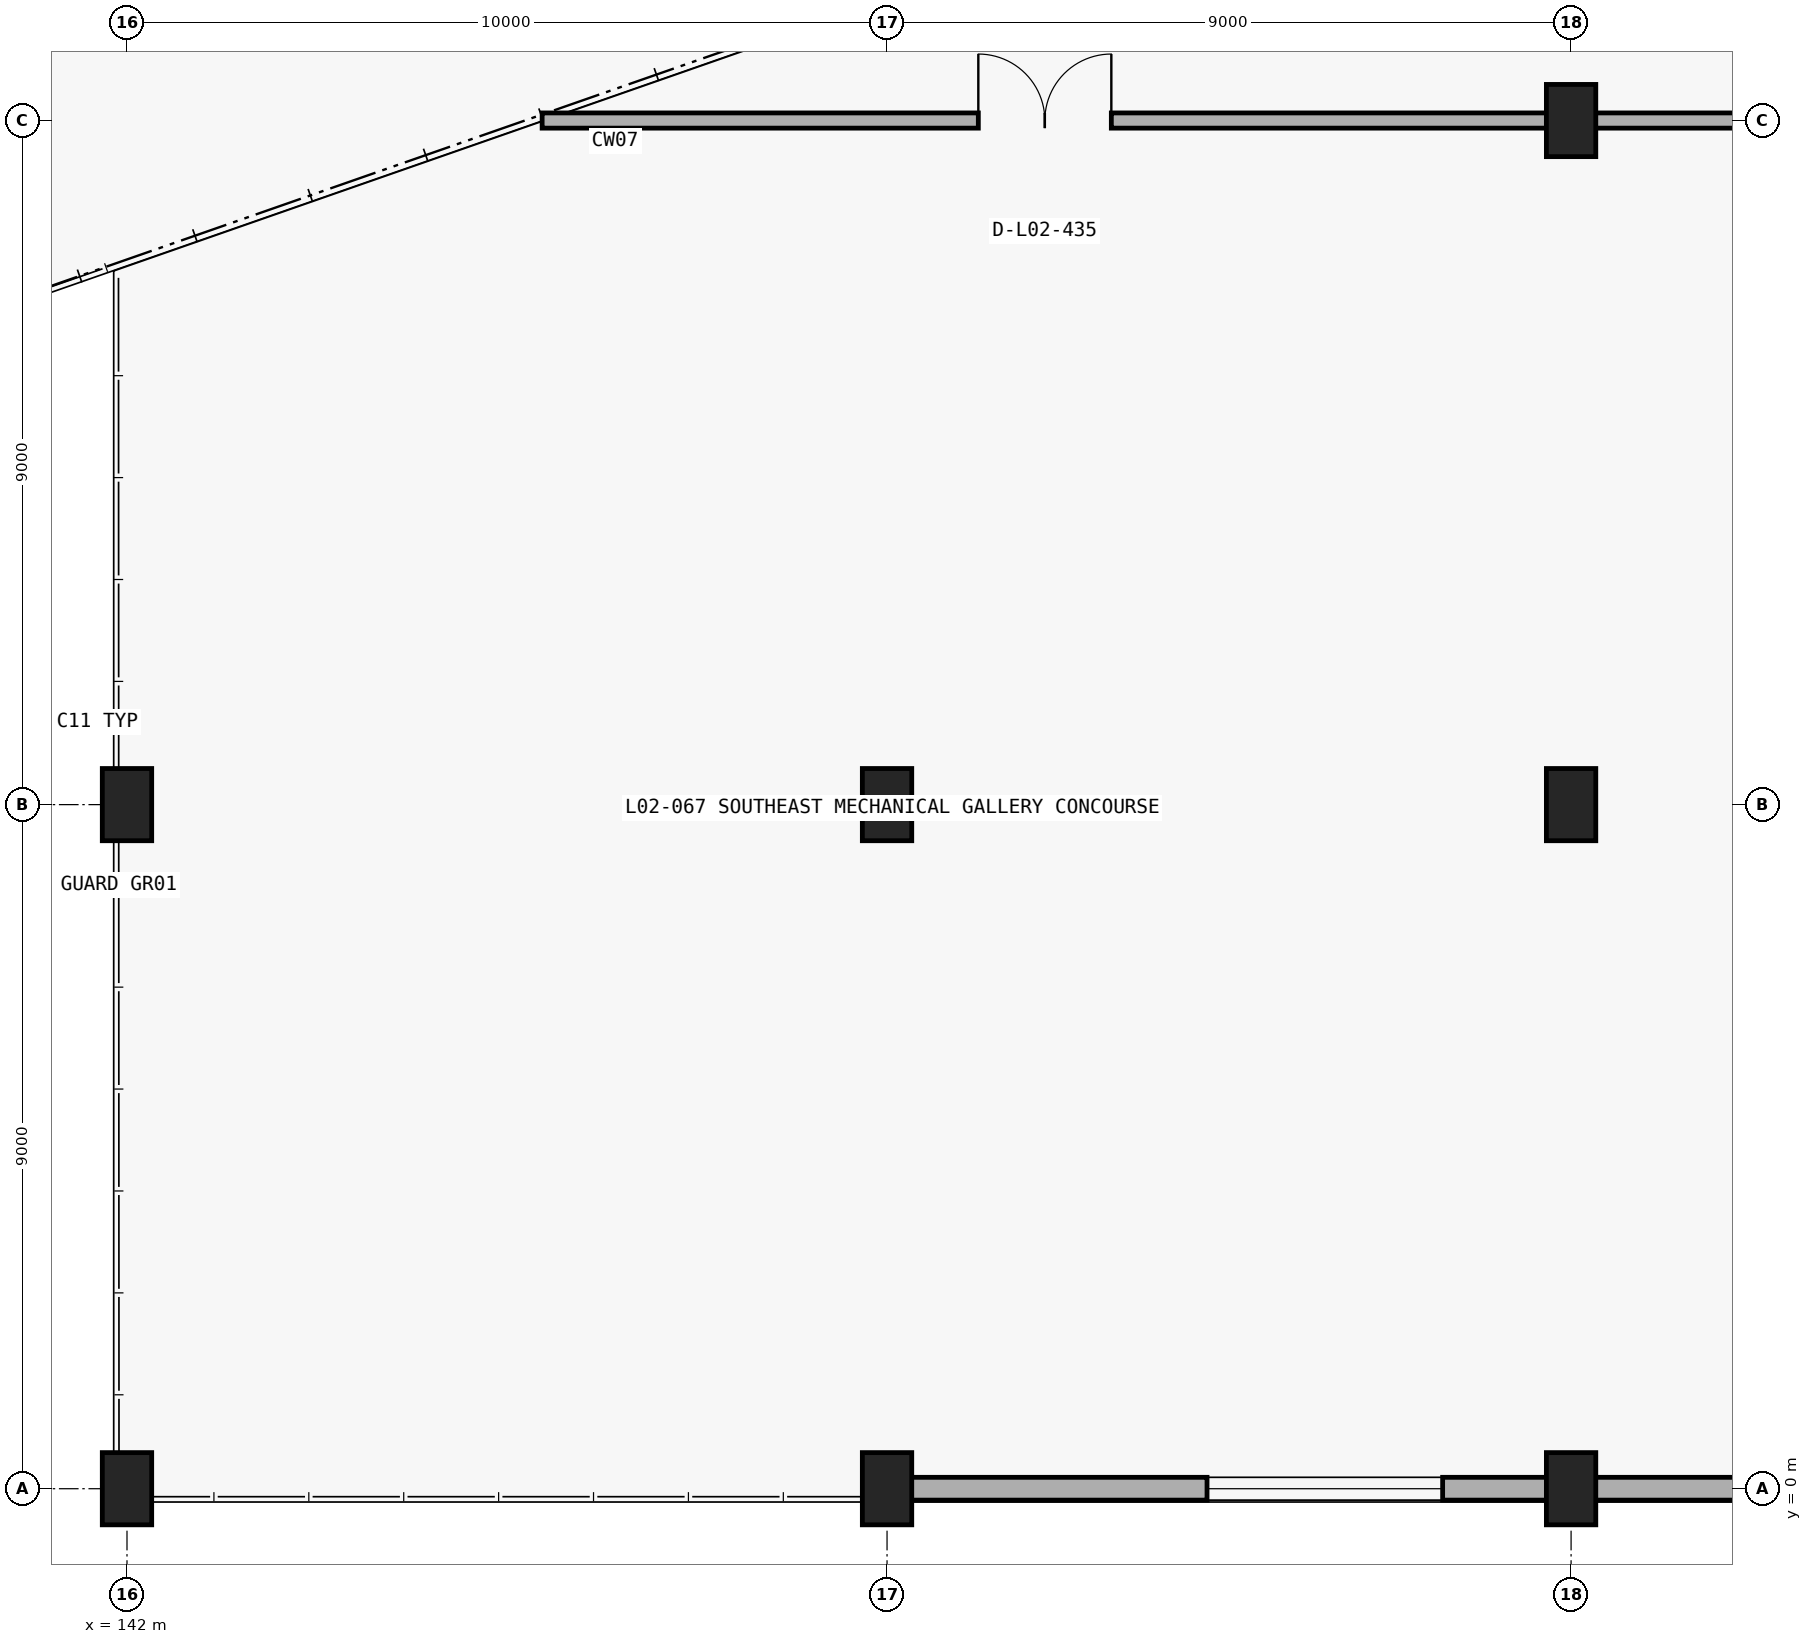
"""IFC4 building model, lengths in metres.
Left out: names, types, materials, properties, quantities, classifications, styles, units other than length and angle.
Written with IfcOpenShell. Run it as: python <this file> out.ifc"""

import sys

from ifc_helpers import new_model, si_unit, direction, frame, frame_2d, origin, origin_2d, place, context, subcontext, project, spatial, rectangle, extrude, element, fill, save


model = new_model("IFC4")
c1 = context("Model", 3, precision=1e-05, world=origin(), true_north=direction((0.0, 1.0)))
c2 = subcontext(c1, "Body", "Model", "MODEL_VIEW")
j1 = project(units=[si_unit("LENGTHUNIT", "METRE"), si_unit("PLANEANGLEUNIT", "RADIAN")], contexts=[c1])
p1 = place(None, origin())
s1 = spatial("IfcSite", under=j1, at=p1, CompositionType="ELEMENT")
p2 = place(p1, origin())
s2 = spatial("IfcBuilding", under=s1, at=p2, CompositionType="ELEMENT")
p3 = place(p2, frame((0.0, 0.0, 10.2)))
s3 = spatial("IfcBuildingStorey", under=s2, at=p3, CompositionType="ELEMENT", Elevation=10.2)
for number, where, z_axis, x_axis in (
    (1, (142.0, 0.0, 0.0), (0.0, 0.0, 1.0), (1.0, 0.0, 0.0)),
    (2, (142.0, 9.0, 0.0), (0.0, 0.0, 1.0), (1.0, 0.0, 0.0)),
    (3, (152.0, 0.0, 0.0), (0.0, 0.0, 1.0), (1.0, 0.0, 0.0)),
    (4, (152.0, 9.0, 0.0), (0.0, 0.0, 1.0), (1.0, 0.0, 0.0)),
    (5, (161.0, 0.0, 0.0), (0.0, 0.0, 1.0), (1.0, 0.0, 0.0)),
    (6, (161.0, 9.0, 0.0), (0.0, 0.0, 1.0), (1.0, 0.0, 0.0)),
    (7, (161.0, 18.0, 0.0), (0.0, 0.0, 1.0), (1.0, 0.0, 0.0)),
):
    element("IfcColumn", number, at=place(p3, frame(where, z_axis=z_axis, x_axis=x_axis)), inside=s3, PredefinedType="COLUMN", context=c2, shape_type="SweptSolid", body=[
        extrude(rectangle(XDim=0.65, YDim=0.95, at=origin_2d()), origin(), (0.0, 0.0, 1.0), 4.8),
    ])
p4 = place(p3, frame((169.7, 0.0, 0.0), z_axis=(0.0, 0.0, 1.0), x_axis=(-1.0, 0.0, 0.0)))
e8 = element("IfcWall", 8, at=p4, inside=s3, PredefinedType="STANDARD", context=c2, shape_type="SweptSolid", body=[
    extrude(rectangle(XDim=8.4, YDim=0.3, at=frame_2d((4.2, 0.0))), origin(), (0.0, 0.0, 1.0), 3.855),
])
p5 = place(p4, frame((1.79, 0.0, 0.95)))
e9 = element("IfcOpeningElement", 9, at=p5, cuts=e8, PredefinedType="OPENING", context=c2, shape_type="SweptSolid", body=[
    extrude(rectangle(XDim=2.3, YDim=2.3, at=frame_2d((1.15, 1.15))), frame((0.0, 0.16, 0.0), z_axis=(0.0, -1.0, 0.0), x_axis=(1.0, 0.0, 0.0)), (0.0, 0.0, 1.0), 0.32),
])
p6 = place(p3, frame((160.7, 0.0, 0.0), z_axis=(0.0, 0.0, 1.0), x_axis=(-1.0, 0.0, 0.0)))
e10 = element("IfcWall", 10, at=p6, inside=s3, PredefinedType="STANDARD", context=c2, shape_type="SweptSolid", body=[
    extrude(rectangle(XDim=8.4, YDim=0.3, at=frame_2d((4.2, 0.0))), origin(), (0.0, 0.0, 1.0), 3.855),
])
p7 = place(p6, frame((1.39, 0.0, 0.95)))
e11 = element("IfcOpeningElement", 11, at=p7, cuts=e10, PredefinedType="OPENING", context=c2, shape_type="SweptSolid", body=[
    extrude(rectangle(XDim=3.1, YDim=2.35, at=frame_2d((1.55, 1.175))), frame((0.0, 0.16, 0.0), z_axis=(0.0, -1.0, 0.0), x_axis=(1.0, 0.0, 0.0)), (0.0, 0.0, 1.0), 0.32),
])
p8 = place(p3, frame((147.462, 18.0, 0.0), z_axis=(0.0, 0.0, 1.0), x_axis=(1.0, 0.0, 0.0)))
e12 = element("IfcWall", 12, at=p8, inside=s3, PredefinedType="PARTITIONING", context=c2, shape_type="SweptSolid", body=[
    extrude(rectangle(XDim=13.228, YDim=0.2, at=frame_2d((6.614, 0.0))), origin(), (0.0, 0.0, 1.0), 3.783),
])
p9 = place(p8, frame((5.739, 0.0, 0.0)))
e13 = element("IfcOpeningElement", 13, at=p9, cuts=e12, PredefinedType="OPENING", context=c2, shape_type="SweptSolid", body=[
    extrude(rectangle(XDim=1.75, YDim=2.3, at=frame_2d((0.875, 1.15))), frame((0.0, 0.11, 0.0), z_axis=(0.0, -1.0, 0.0), x_axis=(1.0, 0.0, 0.0)), (0.0, 0.0, 1.0), 0.22),
])
p10 = place(p3, frame((160.675, 18.0, 0.0), z_axis=(0.0, 0.0, 1.0), x_axis=(1.0, 0.0, 0.0)))
e14 = element("IfcWall", 14, at=p10, inside=s3, PredefinedType="PARTITIONING", context=c2, shape_type="SweptSolid", body=[
    extrude(rectangle(XDim=9.015, YDim=0.2, at=frame_2d((4.507, 0.0))), origin(), (0.0, 0.0, 1.0), 3.855),
])
p11 = place(p10, frame((3.532, 0.0, 0.0)))
e15 = element("IfcOpeningElement", 15, at=p11, cuts=e14, PredefinedType="OPENING", context=c2, shape_type="SweptSolid", body=[
    extrude(rectangle(XDim=1.95, YDim=2.35, at=frame_2d((0.975, 1.175))), frame((0.0, 0.11, 0.0), z_axis=(0.0, -1.0, 0.0), x_axis=(1.0, 0.0, 0.0)), (0.0, 0.0, 1.0), 0.22),
])
p12 = place(p7, origin())
e16 = element("IfcWindow", 16, at=p12, inside=s3, PartitioningType="SINGLE_PANEL", PredefinedType="WINDOW", context=c2, shape_type="SweptSolid", body=[
    extrude(rectangle(XDim=3.1, YDim=2.35, at=frame_2d((1.55, 1.175))), frame((0.0, 0.03, 0.0), z_axis=(0.0, -1.0, 0.0), x_axis=(1.0, 0.0, 0.0)), (0.0, 0.0, 1.0), 0.06),
])
fill(e11, e16)
p13 = place(p9, origin())
e17 = element("IfcDoor", 17, at=p13, inside=s3, OperationType="DOUBLE_DOOR_SINGLE_SWING", PredefinedType="DOOR", context=c2, shape_type="SweptSolid", body=[
    extrude(rectangle(XDim=1.75, YDim=2.3, at=frame_2d((0.875, 1.15))), frame((0.0, 0.025, 0.0), z_axis=(0.0, -1.0, 0.0), x_axis=(1.0, 0.0, 0.0)), (0.0, 0.0, 1.0), 0.05),
])
fill(e13, e17)
save(model, sys.argv[1])
